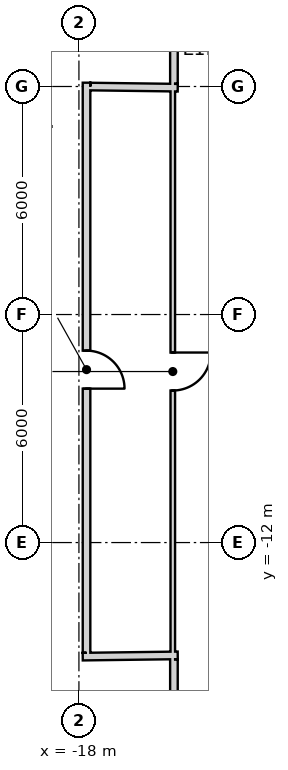
"""IFC4 building model, lengths in metres.
Left out: names, types, materials, properties, quantities, classifications, styles, units other than length and angle.
Written with IfcOpenShell. Run it as: python <this file> out.ifc"""

import sys

from ifc_helpers import new_model, si_unit, direction, frame, frame_2d, origin, place, context, subcontext, project, spatial, rectangle, extrude, element, fill, save


model = new_model("IFC4")
c1 = context("Model", 3, precision=1e-05, world=origin(), true_north=direction((0.0, 1.0)))
c2 = subcontext(c1, "Body", "Model", "MODEL_VIEW")
j1 = project(units=[si_unit("LENGTHUNIT", "METRE"), si_unit("PLANEANGLEUNIT", "RADIAN")], contexts=[c1])
p1 = place(None, origin())
s1 = spatial("IfcSite", under=j1, at=p1, CompositionType="ELEMENT")
p2 = place(p1, origin())
s2 = spatial("IfcBuilding", under=s1, at=p2, CompositionType="ELEMENT")
p3 = place(p2, frame((0.0, 0.0, 322.1)))
s3 = spatial("IfcBuildingStorey", under=s2, at=p3, CompositionType="ELEMENT", Elevation=322.1)
p4 = place(p3, frame((-15.53, 0.0, 0.0), z_axis=(0.0, 0.0, 1.0), x_axis=(0.0, -1.0, 0.0)))
e1 = element("IfcWall", 1, at=p4, inside=s3, PredefinedType="PARTITIONING", context=c2, shape_type="SweptSolid", body=[
    extrude(rectangle(XDim=15.0, YDim=0.12, at=frame_2d((7.5, 0.0))), origin(), (0.0, 0.0, 1.0), 2.97),
])
p5 = place(p4, frame((7.0, 0.0, 0.0)))
e2 = element("IfcOpeningElement", 2, at=p5, cuts=e1, PredefinedType="OPENING", context=c2, shape_type="SweptSolid", body=[
    extrude(rectangle(XDim=1.0, YDim=2.1, at=frame_2d((0.5, 1.05))), frame((0.0, 0.07, 0.0), z_axis=(0.0, -1.0, 0.0), x_axis=(1.0, 0.0, 0.0)), (0.0, 0.0, 1.0), 0.14),
])
p6 = place(p3, frame((-17.9, -15.001, 0.0), z_axis=(0.0, 0.0, 1.0), x_axis=(0.999915662945, 0.012987185857, 0.0)))
e3 = element("IfcWall", 3, at=p6, inside=s3, PredefinedType="PARTITIONING", context=c2, shape_type="SweptSolid", body=[
    extrude(rectangle(XDim=2.5, YDim=0.2, at=frame_2d((1.25, 0.0))), origin(), (0.0, 0.0, 1.0), 3.6),
])
p7 = place(p3, frame((-17.8, 0.1, 0.0), z_axis=(0.0, 0.0, 1.0), x_axis=(0.0, -1.0, 0.0)))
e4 = element("IfcWall", 4, at=p7, inside=s3, PredefinedType="PARTITIONING", context=c2, shape_type="SweptSolid", body=[
    extrude(rectangle(XDim=15.0, YDim=0.2, at=frame_2d((7.5, 0.0))), origin(), (0.0, 0.0, 1.0), 2.97),
])
p8 = place(p7, frame((7.05, 0.0, 0.0)))
e5 = element("IfcOpeningElement", 5, at=p8, cuts=e4, PredefinedType="OPENING", context=c2, shape_type="SweptSolid", body=[
    extrude(rectangle(XDim=1.0, YDim=2.1, at=frame_2d((0.5, 1.05))), frame((0.0, 0.11, 0.0), z_axis=(0.0, -1.0, 0.0), x_axis=(1.0, 0.0, 0.0)), (0.0, 0.0, 1.0), 0.22),
])
p9 = place(p3, frame((-15.4, -0.031, 0.0), z_axis=(0.0, 0.0, 1.0), x_axis=(-0.999914782125, 0.013054826261, 0.0)))
e6 = element("IfcWall", 6, at=p9, inside=s3, PredefinedType="PARTITIONING", context=c2, shape_type="SweptSolid", body=[
    extrude(rectangle(XDim=2.3, YDim=0.2, at=frame_2d((1.15, 0.0))), origin(), (0.0, 0.0, 1.0), 3.6),
])
p10 = place(p3, frame((-15.5, 10.2, 0.0), z_axis=(0.0, 0.0, 1.0), x_axis=(0.0, -1.0, 0.0)))
e7 = element("IfcWall", 7, at=p10, inside=s3, PredefinedType="PARTITIONING", context=c2, shape_type="SweptSolid", body=[
    extrude(rectangle(XDim=10.13, YDim=0.2, at=frame_2d((5.065, 0.0))), origin(), (0.0, 0.0, 1.0), 2.97),
])
p11 = place(p3, frame((-15.5, -15.07, 0.0), z_axis=(0.0, 0.0, 1.0), x_axis=(0.0, -1.0, 0.0)))
e8 = element("IfcWall", 8, at=p11, inside=s3, PredefinedType="PARTITIONING", context=c2, shape_type="SweptSolid", body=[
    extrude(rectangle(XDim=1.271, YDim=0.2, at=frame_2d((0.635, 0.0))), origin(), (0.0, 0.0, 1.0), 3.6),
])
p12 = place(p5, origin())
e9 = element("IfcDoor", 9, at=p12, inside=s3, OperationType="SINGLE_SWING_LEFT", PredefinedType="NOTDEFINED", context=c2, shape_type="SweptSolid", body=[
    extrude(rectangle(XDim=1.0, YDim=2.1, at=frame_2d((0.5, 1.05))), frame((0.0, 0.025, 0.0), z_axis=(0.0, -1.0, 0.0), x_axis=(1.0, 0.0, 0.0)), (0.0, 0.0, 1.0), 0.05),
])
fill(e2, e9)
p13 = place(p8, origin())
e10 = element("IfcDoor", 10, at=p13, inside=s3, OperationType="SINGLE_SWING_RIGHT", PredefinedType="USERDEFINED", context=c2, shape_type="SweptSolid", body=[
    extrude(rectangle(XDim=1.0, YDim=2.1, at=frame_2d((0.5, 1.05))), frame((0.0, 0.025, 0.0), z_axis=(0.0, -1.0, 0.0), x_axis=(1.0, 0.0, 0.0)), (0.0, 0.0, 1.0), 0.05),
])
fill(e5, e10)
save(model, sys.argv[1])
